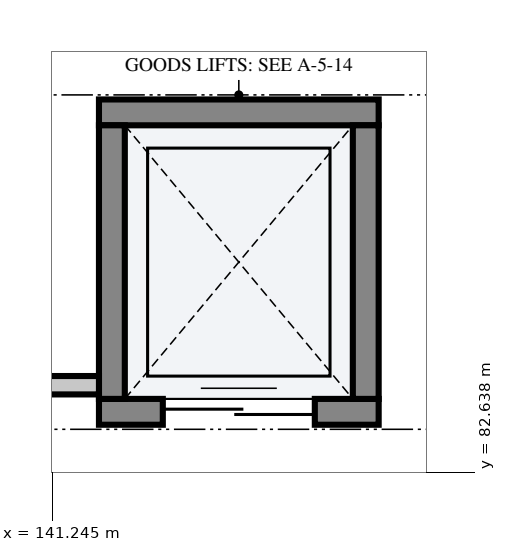
"""IFC4 building model, lengths in metres.
Left out: names, types, materials, properties, quantities, classifications, styles, units other than length and angle.
Written with IfcOpenShell. Run it as: python <this file> out.ifc"""

import sys

from ifc_helpers import new_model, si_unit, direction, frame, frame_2d, origin, place, context, subcontext, project, spatial, rectangle, extrude, element, fill, save


model = new_model("IFC4")
c1 = context("Model", 3, precision=1e-05, world=origin(), true_north=direction((0.0, 1.0)))
c2 = subcontext(c1, "Body", "Model", "MODEL_VIEW")
j1 = project(units=[si_unit("LENGTHUNIT", "METRE"), si_unit("PLANEANGLEUNIT", "RADIAN")], contexts=[c1])
p1 = place(None, origin())
s1 = spatial("IfcSite", under=j1, at=p1, CompositionType="ELEMENT")
p2 = place(p1, origin())
s2 = spatial("IfcBuilding", under=s1, at=p2, CompositionType="ELEMENT")
p3 = place(p2, frame((0.0, 0.0, 5.4)))
s3 = spatial("IfcBuildingStorey", under=s2, at=p3, CompositionType="ELEMENT", Elevation=5.4)
p4 = place(p3, frame((141.86, 83.43, 0.0), z_axis=(0.0, 0.0, 1.0), x_axis=(1.0, 0.0, 0.0)))
e1 = element("IfcWall", 1, at=p4, inside=s3, PredefinedType="SHEAR", context=c2, shape_type="SweptSolid", body=[
    extrude(rectangle(XDim=3.68, YDim=0.34, at=frame_2d((1.84, 0.0))), origin(), (0.0, 0.0, 1.0), 4.505),
])
p5 = place(p4, frame((0.84, 0.0, 0.0)))
e2 = element("IfcOpeningElement", 2, at=p5, cuts=e1, PredefinedType="OPENING", context=c2, shape_type="SweptSolid", body=[
    extrude(rectangle(XDim=2.0, YDim=2.4, at=frame_2d((1.0, 1.2))), frame((0.0, 0.182, 0.0), z_axis=(0.0, -1.0, 0.0), x_axis=(1.0, 0.0, 0.0)), (0.0, 0.0, 1.0), 0.364),
])
p6 = place(p3, frame((141.86, 87.37, 0.0), z_axis=(0.0, 0.0, 1.0), x_axis=(1.0, 0.0, 0.0)))
e3 = element("IfcWall", 3, at=p6, inside=s3, PredefinedType="SHEAR", context=c2, shape_type="SweptSolid", body=[
    extrude(rectangle(XDim=3.68, YDim=0.34, at=frame_2d((1.84, 0.0))), origin(), (0.0, 0.0, 1.0), 4.505),
])
for number, where, z_axis, x_axis in (
    (4, (142.03, 83.6, 0.0), (0.0, 0.0, 1.0), (0.0, 1.0, 0.0)),
    (5, (145.37, 83.6, 0.0), (0.0, 0.0, 1.0), (0.0, 1.0, 0.0)),
):
    element("IfcWall", number, at=place(p3, frame(where, z_axis=z_axis, x_axis=x_axis)), inside=s3, PredefinedType="SHEAR", context=c2, shape_type="SweptSolid", body=[
        extrude(rectangle(XDim=3.6, YDim=0.34, at=frame_2d((1.8, 0.0))), origin(), (0.0, 0.0, 1.0), 4.505),
    ])
p7 = place(p3, frame((141.86, 83.78, 0.0), z_axis=(0.0, 0.0, 1.0), x_axis=(-1.0, 0.0, 0.0)))
e6 = element("IfcWall", 6, at=p7, inside=s3, PredefinedType="PARTITIONING", context=c2, shape_type="SweptSolid", body=[
    extrude(rectangle(XDim=5.32, YDim=0.242, at=frame_2d((2.66, 0.0))), origin(), (0.0, 0.0, 1.0), 3.445),
])
p8 = place(p5, origin())
e7 = element("IfcDoor", 7, at=p8, inside=s3, OperationType="DOUBLE_DOOR_SLIDING", PredefinedType="DOOR", context=c2, shape_type="SweptSolid", body=[
    extrude(rectangle(XDim=2.0, YDim=2.4, at=frame_2d((1.0, 1.2))), frame((0.0, 0.025, 0.0), z_axis=(0.0, -1.0, 0.0), x_axis=(1.0, 0.0, 0.0)), (0.0, 0.0, 1.0), 0.05),
])
fill(e2, e7)
save(model, sys.argv[1])
